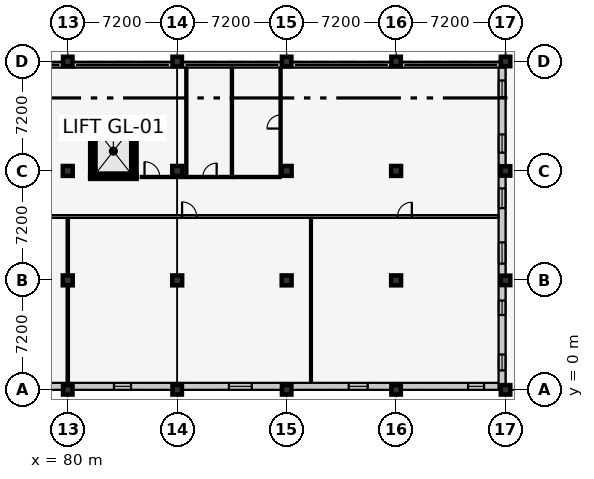
"""IFC4 building model, lengths in metres.
Left out: names, types, materials, properties, quantities, classifications, styles, units other than length and angle.
Written with IfcOpenShell. Run it as: python <this file> out.ifc"""

import sys

from ifc_helpers import new_model, si_unit, direction, frame, frame_2d, origin, origin_2d, place, context, subcontext, project, spatial, rectangle, extrude, element, fill, save


model = new_model("IFC4")
c1 = context("Model", 3, precision=1e-05, world=origin(), true_north=direction((0.0, 1.0)))
c2 = subcontext(c1, "Body", "Model", "MODEL_VIEW")
j1 = project(units=[si_unit("LENGTHUNIT", "METRE"), si_unit("PLANEANGLEUNIT", "RADIAN")], contexts=[c1])
p1 = place(None, origin())
s1 = spatial("IfcSite", under=j1, at=p1, CompositionType="ELEMENT")
p2 = place(p1, origin())
s2 = spatial("IfcBuilding", under=s1, at=p2, CompositionType="ELEMENT")
p3 = place(p2, frame((0.0, 0.0, 5.4)))
s3 = spatial("IfcBuildingStorey", under=s2, at=p3, CompositionType="ELEMENT", Elevation=5.4)
p4 = place(p3, frame((80.0, 0.0, 0.0), z_axis=(0.0, 0.0, 1.0), x_axis=(1.0, 0.0, 0.0)))
e1 = element("IfcColumn", 1, at=p4, inside=s3, PredefinedType="COLUMN", context=c2, shape_type="SweptSolid", body=[
    extrude(rectangle(XDim=0.62, YDim=0.62, at=origin_2d()), origin(), (0.0, 0.0, 1.0), 4.2),
])
for number, where, z_axis, x_axis in (
    (2, (80.0, 7.2, 0.0), (0.0, 0.0, 1.0), (1.0, 0.0, 0.0)),
    (3, (80.0, 14.4, 0.0), (0.0, 0.0, 1.0), (1.0, 0.0, 0.0)),
):
    element("IfcColumn", number, at=place(p3, frame(where, z_axis=z_axis, x_axis=x_axis)), inside=s3, PredefinedType="COLUMN", context=c2, shape_type="SweptSolid", body=[
        extrude(rectangle(XDim=0.65, YDim=0.65, at=origin_2d()), origin(), (0.0, 0.0, 1.0), 4.2),
    ])
for number, where, z_axis, x_axis in (
    (4, (80.0, 21.6, 0.0), (0.0, 0.0, 1.0), (1.0, 0.0, 0.0)),
    (5, (87.2, 0.0, 0.0), (0.0, 0.0, 1.0), (1.0, 0.0, 0.0)),
):
    element("IfcColumn", number, at=place(p3, frame(where, z_axis=z_axis, x_axis=x_axis)), inside=s3, PredefinedType="COLUMN", context=c2, shape_type="SweptSolid", body=[
        extrude(rectangle(XDim=0.62, YDim=0.62, at=origin_2d()), origin(), (0.0, 0.0, 1.0), 4.2),
    ])
for number, where, z_axis, x_axis in (
    (6, (87.2, 7.2, 0.0), (0.0, 0.0, 1.0), (1.0, 0.0, 0.0)),
    (7, (87.2, 14.4, 0.0), (0.0, 0.0, 1.0), (1.0, 0.0, 0.0)),
):
    element("IfcColumn", number, at=place(p3, frame(where, z_axis=z_axis, x_axis=x_axis)), inside=s3, PredefinedType="COLUMN", context=c2, shape_type="SweptSolid", body=[
        extrude(rectangle(XDim=0.65, YDim=0.65, at=origin_2d()), origin(), (0.0, 0.0, 1.0), 4.2),
    ])
for number, where, z_axis, x_axis in (
    (8, (87.2, 21.6, 0.0), (0.0, 0.0, 1.0), (1.0, 0.0, 0.0)),
    (9, (94.4, 0.0, 0.0), (0.0, 0.0, 1.0), (1.0, 0.0, 0.0)),
):
    element("IfcColumn", number, at=place(p3, frame(where, z_axis=z_axis, x_axis=x_axis)), inside=s3, PredefinedType="COLUMN", context=c2, shape_type="SweptSolid", body=[
        extrude(rectangle(XDim=0.62, YDim=0.62, at=origin_2d()), origin(), (0.0, 0.0, 1.0), 4.2),
    ])
for number, where, z_axis, x_axis in (
    (10, (94.4, 7.2, 0.0), (0.0, 0.0, 1.0), (1.0, 0.0, 0.0)),
    (11, (94.4, 14.4, 0.0), (0.0, 0.0, 1.0), (1.0, 0.0, 0.0)),
):
    element("IfcColumn", number, at=place(p3, frame(where, z_axis=z_axis, x_axis=x_axis)), inside=s3, PredefinedType="COLUMN", context=c2, shape_type="SweptSolid", body=[
        extrude(rectangle(XDim=0.65, YDim=0.65, at=origin_2d()), origin(), (0.0, 0.0, 1.0), 4.2),
    ])
for number, where, z_axis, x_axis in (
    (12, (94.4, 21.6, 0.0), (0.0, 0.0, 1.0), (1.0, 0.0, 0.0)),
    (13, (101.6, 0.0, 0.0), (0.0, 0.0, 1.0), (1.0, 0.0, 0.0)),
):
    element("IfcColumn", number, at=place(p3, frame(where, z_axis=z_axis, x_axis=x_axis)), inside=s3, PredefinedType="COLUMN", context=c2, shape_type="SweptSolid", body=[
        extrude(rectangle(XDim=0.62, YDim=0.62, at=origin_2d()), origin(), (0.0, 0.0, 1.0), 4.2),
    ])
for number, where, z_axis, x_axis in (
    (14, (101.6, 7.2, 0.0), (0.0, 0.0, 1.0), (1.0, 0.0, 0.0)),
    (15, (101.6, 14.4, 0.0), (0.0, 0.0, 1.0), (1.0, 0.0, 0.0)),
):
    element("IfcColumn", number, at=place(p3, frame(where, z_axis=z_axis, x_axis=x_axis)), inside=s3, PredefinedType="COLUMN", context=c2, shape_type="SweptSolid", body=[
        extrude(rectangle(XDim=0.65, YDim=0.65, at=origin_2d()), origin(), (0.0, 0.0, 1.0), 4.2),
    ])
for number, where, z_axis, x_axis in (
    (16, (101.6, 21.6, 0.0), (0.0, 0.0, 1.0), (1.0, 0.0, 0.0)),
    (17, (108.8, 0.0, 0.0), (0.0, 0.0, 1.0), (1.0, 0.0, 0.0)),
    (18, (108.8, 7.2, 0.0), (0.0, 0.0, 1.0), (1.0, 0.0, 0.0)),
    (19, (108.8, 14.4, 0.0), (0.0, 0.0, 1.0), (1.0, 0.0, 0.0)),
    (20, (108.8, 21.6, 0.0), (0.0, 0.0, 1.0), (1.0, 0.0, 0.0)),
):
    element("IfcColumn", number, at=place(p3, frame(where, z_axis=z_axis, x_axis=x_axis)), inside=s3, PredefinedType="COLUMN", context=c2, shape_type="SweptSolid", body=[
        extrude(rectangle(XDim=0.62, YDim=0.62, at=origin_2d()), origin(), (0.0, 0.0, 1.0), 4.2),
    ])
p5 = place(p3, frame((108.8, 0.23, 0.0), z_axis=(0.0, 0.0, 1.0), x_axis=(-1.0, 0.0, 0.0)))
e21 = element("IfcWall", 21, at=p5, inside=s3, PredefinedType="SOLIDWALL", context=c2, shape_type="SweptSolid", body=[
    extrude(rectangle(XDim=50.4, YDim=0.46, at=frame_2d((25.2, 0.0))), origin(), (0.0, 0.0, 1.0), 3.245),
])
p6 = place(p5, frame((1.414, 0.0, 0.9)))
e22 = element("IfcOpeningElement", 22, at=p6, cuts=e21, PredefinedType="OPENING", context=c2, shape_type="SweptSolid", body=[
    extrude(rectangle(XDim=1.05, YDim=1.6, at=frame_2d((0.525, 0.8))), frame((0.0, 0.242, 0.0), z_axis=(0.0, -1.0, 0.0), x_axis=(1.0, 0.0, 0.0)), (0.0, 0.0, 1.0), 0.484),
])
p7 = place(p5, frame((9.067, 0.0, 0.9)))
e23 = element("IfcOpeningElement", 23, at=p7, cuts=e21, PredefinedType="OPENING", context=c2, shape_type="SweptSolid", body=[
    extrude(rectangle(XDim=1.25, YDim=1.6, at=frame_2d((0.625, 0.8))), frame((0.0, 0.242, 0.0), z_axis=(0.0, -1.0, 0.0), x_axis=(1.0, 0.0, 0.0)), (0.0, 0.0, 1.0), 0.484),
])
p8 = place(p5, frame((16.696, 0.0, 0.9)))
e24 = element("IfcOpeningElement", 24, at=p8, cuts=e21, PredefinedType="OPENING", context=c2, shape_type="SweptSolid", body=[
    extrude(rectangle(XDim=1.5, YDim=1.6, at=frame_2d((0.75, 0.8))), frame((0.0, 0.242, 0.0), z_axis=(0.0, -1.0, 0.0), x_axis=(1.0, 0.0, 0.0)), (0.0, 0.0, 1.0), 0.484),
])
p9 = place(p5, frame((24.64, 0.0, 0.9)))
e25 = element("IfcOpeningElement", 25, at=p9, cuts=e21, PredefinedType="OPENING", context=c2, shape_type="SweptSolid", body=[
    extrude(rectangle(XDim=1.12, YDim=1.75, at=frame_2d((0.56, 0.875))), frame((0.0, 0.242, 0.0), z_axis=(0.0, -1.0, 0.0), x_axis=(1.0, 0.0, 0.0)), (0.0, 0.0, 1.0), 0.484),
])
p10 = place(p5, frame((32.284, 0.0, 0.9)))
e26 = element("IfcOpeningElement", 26, at=p10, cuts=e21, PredefinedType="OPENING", context=c2, shape_type="SweptSolid", body=[
    extrude(rectangle(XDim=1.34, YDim=1.75, at=frame_2d((0.67, 0.875))), frame((0.0, 0.242, 0.0), z_axis=(0.0, -1.0, 0.0), x_axis=(1.0, 0.0, 0.0)), (0.0, 0.0, 1.0), 0.484),
])
p11 = place(p5, frame((39.958, 0.0, 0.9)))
e27 = element("IfcOpeningElement", 27, at=p11, cuts=e21, PredefinedType="OPENING", context=c2, shape_type="SweptSolid", body=[
    extrude(rectangle(XDim=1.5, YDim=1.75, at=frame_2d((0.75, 0.875))), frame((0.0, 0.242, 0.0), z_axis=(0.0, -1.0, 0.0), x_axis=(1.0, 0.0, 0.0)), (0.0, 0.0, 1.0), 0.484),
])
p12 = place(p5, frame((44.135, 0.0, 0.9)))
e28 = element("IfcOpeningElement", 28, at=p12, cuts=e21, PredefinedType="OPENING", context=c2, shape_type="SweptSolid", body=[
    extrude(rectangle(XDim=0.9, YDim=1.35, at=frame_2d((0.45, 0.675))), frame((0.0, 0.242, 0.0), z_axis=(0.0, -1.0, 0.0), x_axis=(1.0, 0.0, 0.0)), (0.0, 0.0, 1.0), 0.484),
])
p13 = place(p5, frame((47.961, 0.0, 0.9)))
e29 = element("IfcOpeningElement", 29, at=p13, cuts=e21, PredefinedType="OPENING", context=c2, shape_type="SweptSolid", body=[
    extrude(rectangle(XDim=1.0, YDim=1.35, at=frame_2d((0.5, 0.675))), frame((0.0, 0.242, 0.0), z_axis=(0.0, -1.0, 0.0), x_axis=(1.0, 0.0, 0.0)), (0.0, 0.0, 1.0), 0.484),
])
p14 = place(p3, frame((108.57, 21.6, 0.0), z_axis=(0.0, 0.0, 1.0), x_axis=(0.0, -1.0, 0.0)))
e30 = element("IfcWall", 30, at=p14, inside=s3, PredefinedType="SOLIDWALL", context=c2, shape_type="SweptSolid", body=[
    extrude(rectangle(XDim=21.6, YDim=0.46, at=frame_2d((10.8, 0.0))), origin(), (0.0, 0.0, 1.0), 3.215),
])
p15 = place(p14, frame((1.25, 0.0, 0.9)))
e31 = element("IfcOpeningElement", 31, at=p15, cuts=e30, PredefinedType="OPENING", context=c2, shape_type="SweptSolid", body=[
    extrude(rectangle(XDim=1.1, YDim=1.35, at=frame_2d((0.55, 0.675))), frame((0.0, 0.242, 0.0), z_axis=(0.0, -1.0, 0.0), x_axis=(1.0, 0.0, 0.0)), (0.0, 0.0, 1.0), 0.484),
])
p16 = place(p14, frame((4.8, 0.0, 0.9)))
e32 = element("IfcOpeningElement", 32, at=p16, cuts=e30, PredefinedType="OPENING", context=c2, shape_type="SweptSolid", body=[
    extrude(rectangle(XDim=1.2, YDim=1.35, at=frame_2d((0.6, 0.675))), frame((0.0, 0.242, 0.0), z_axis=(0.0, -1.0, 0.0), x_axis=(1.0, 0.0, 0.0)), (0.0, 0.0, 1.0), 0.484),
])
p17 = place(p14, frame((8.35, 0.0, 0.9)))
e33 = element("IfcOpeningElement", 33, at=p17, cuts=e30, PredefinedType="OPENING", context=c2, shape_type="SweptSolid", body=[
    extrude(rectangle(XDim=1.3, YDim=1.35, at=frame_2d((0.65, 0.675))), frame((0.0, 0.242, 0.0), z_axis=(0.0, -1.0, 0.0), x_axis=(1.0, 0.0, 0.0)), (0.0, 0.0, 1.0), 0.484),
])
p18 = place(p14, frame((11.9, 0.0, 0.9)))
e34 = element("IfcOpeningElement", 34, at=p18, cuts=e30, PredefinedType="OPENING", context=c2, shape_type="SweptSolid", body=[
    extrude(rectangle(XDim=1.4, YDim=1.35, at=frame_2d((0.7, 0.675))), frame((0.0, 0.242, 0.0), z_axis=(0.0, -1.0, 0.0), x_axis=(1.0, 0.0, 0.0)), (0.0, 0.0, 1.0), 0.484),
])
p19 = place(p14, frame((15.725, 0.0, 0.9)))
e35 = element("IfcOpeningElement", 35, at=p19, cuts=e30, PredefinedType="OPENING", context=c2, shape_type="SweptSolid", body=[
    extrude(rectangle(XDim=0.95, YDim=1.45, at=frame_2d((0.475, 0.725))), frame((0.0, 0.242, 0.0), z_axis=(0.0, -1.0, 0.0), x_axis=(1.0, 0.0, 0.0)), (0.0, 0.0, 1.0), 0.484),
])
p20 = place(p14, frame((19.275, 0.0, 0.9)))
e36 = element("IfcOpeningElement", 36, at=p20, cuts=e30, PredefinedType="OPENING", context=c2, shape_type="SweptSolid", body=[
    extrude(rectangle(XDim=1.05, YDim=1.45, at=frame_2d((0.525, 0.725))), frame((0.0, 0.242, 0.0), z_axis=(0.0, -1.0, 0.0), x_axis=(1.0, 0.0, 0.0)), (0.0, 0.0, 1.0), 0.484),
])
p21 = place(p3, frame((58.4, 21.37, 0.0), z_axis=(0.0, 0.0, 1.0), x_axis=(1.0, 0.0, 0.0)))
e37 = element("IfcWall", 37, at=p21, inside=s3, PredefinedType="SOLIDWALL", context=c2, shape_type="SweptSolid", body=[
    extrude(rectangle(XDim=50.4, YDim=0.35, at=frame_2d((25.2, 0.0))), origin(), (0.0, 0.0, 1.0), 0.85),
])
p22 = place(p3, frame((81.475, 14.0, 0.0), z_axis=(0.0, 0.0, 1.0), x_axis=(1.0, 0.0, 0.0)))
e38 = element("IfcWall", 38, at=p22, inside=s3, PredefinedType="SHEAR", context=c2, shape_type="SweptSolid", body=[
    extrude(rectangle(XDim=3.05, YDim=0.25, at=frame_2d((1.525, 0.0))), origin(), (0.0, 0.0, 1.0), 3.95),
])
p23 = place(p22, frame((0.725, 0.0, 0.0)))
e39 = element("IfcOpeningElement", 39, at=p23, cuts=e38, PredefinedType="OPENING", context=c2, shape_type="SweptSolid", body=[
    extrude(rectangle(XDim=1.6, YDim=2.3, at=frame_2d((0.8, 1.15))), frame((0.0, 0.137, 0.0), z_axis=(0.0, -1.0, 0.0), x_axis=(1.0, 0.0, 0.0)), (0.0, 0.0, 1.0), 0.274),
])
p24 = place(p3, frame((84.525, 17.4, 0.0), z_axis=(0.0, 0.0, 1.0), x_axis=(-1.0, 0.0, 0.0)))
e40 = element("IfcWall", 40, at=p24, inside=s3, PredefinedType="SHEAR", context=c2, shape_type="SweptSolid", body=[
    extrude(rectangle(XDim=3.05, YDim=0.25, at=frame_2d((1.525, 0.0))), origin(), (0.0, 0.0, 1.0), 3.95),
])
for number, where, z_axis, x_axis in (
    (41, (81.6, 17.4, 0.0), (0.0, 0.0, 1.0), (0.0, -1.0, 0.0)),
    (42, (84.4, 14.0, 0.0), (0.0, 0.0, 1.0), (0.0, 1.0, 0.0)),
):
    element("IfcWall", number, at=place(p3, frame(where, z_axis=z_axis, x_axis=x_axis)), inside=s3, PredefinedType="SHEAR", context=c2, shape_type="SweptSolid", body=[
        extrude(rectangle(XDim=3.4, YDim=0.25, at=frame_2d((1.7, 0.0))), origin(), (0.0, 0.0, 1.0), 3.95),
    ])
p25 = place(p3, frame((58.87, 11.4, 0.0), z_axis=(0.0, 0.0, 1.0), x_axis=(1.0, 0.0, 0.0)))
e43 = element("IfcWall", 43, at=p25, inside=s3, PredefinedType="PARTITIONING", context=c2, shape_type="SweptSolid", body=[
    extrude(rectangle(XDim=49.46, YDim=0.18, at=frame_2d((24.73, 0.0))), origin(), (0.0, 0.0, 1.0), 3.95),
])
p26 = place(p25, frame((10.075, 0.0, 0.0)))
e44 = element("IfcOpeningElement", 44, at=p26, cuts=e43, PredefinedType="OPENING", context=c2, shape_type="SweptSolid", body=[
    extrude(rectangle(XDim=0.98, YDim=2.12, at=frame_2d((0.49, 1.06))), frame((0.0, 0.102, 0.0), z_axis=(0.0, -1.0, 0.0), x_axis=(1.0, 0.0, 0.0)), (0.0, 0.0, 1.0), 0.204),
])
p27 = place(p25, frame((28.65, 0.0, 0.0)))
e45 = element("IfcOpeningElement", 45, at=p27, cuts=e43, PredefinedType="OPENING", context=c2, shape_type="SweptSolid", body=[
    extrude(rectangle(XDim=0.96, YDim=2.1, at=frame_2d((0.48, 1.05))), frame((0.0, 0.102, 0.0), z_axis=(0.0, -1.0, 0.0), x_axis=(1.0, 0.0, 0.0)), (0.0, 0.0, 1.0), 0.204),
])
p28 = place(p25, frame((42.825, 0.0, 0.0)))
e46 = element("IfcOpeningElement", 46, at=p28, cuts=e43, PredefinedType="OPENING", context=c2, shape_type="SweptSolid", body=[
    extrude(rectangle(XDim=0.94, YDim=2.1, at=frame_2d((0.47, 1.05))), frame((0.0, 0.102, 0.0), z_axis=(0.0, -1.0, 0.0), x_axis=(1.0, 0.0, 0.0)), (0.0, 0.0, 1.0), 0.204),
])
p29 = place(p3, frame((80.0, 0.47, 0.0), z_axis=(0.0, 0.0, 1.0), x_axis=(0.0, 1.0, 0.0)))
e47 = element("IfcWall", 47, at=p29, inside=s3, PredefinedType="PARTITIONING", context=c2, shape_type="SweptSolid", body=[
    extrude(rectangle(XDim=10.83, YDim=0.15, at=frame_2d((5.415, 0.0))), origin(), (0.0, 0.0, 1.0), 3.325),
])
p30 = place(p3, frame((96.0, 0.47, 0.0), z_axis=(0.0, 0.0, 1.0), x_axis=(0.0, 1.0, 0.0)))
e48 = element("IfcWall", 48, at=p30, inside=s3, PredefinedType="PARTITIONING", context=c2, shape_type="SweptSolid", body=[
    extrude(rectangle(XDim=10.83, YDim=0.125, at=frame_2d((5.415, 0.0))), origin(), (0.0, 0.0, 1.0), 3.95),
])
p31 = place(p3, frame((84.8, 14.0, 0.0), z_axis=(0.0, 0.0, 1.0), x_axis=(1.0, 0.0, 0.0)))
e49 = element("IfcWall", 49, at=p31, inside=s3, PredefinedType="PARTITIONING", context=c2, shape_type="SweptSolid", body=[
    extrude(rectangle(XDim=3.0, YDim=0.14, at=frame_2d((1.5, 0.0))), origin(), (0.0, 0.0, 1.0), 3.95),
])
p32 = place(p31, frame((0.25, 0.0, 0.0)))
e50 = element("IfcOpeningElement", 50, at=p32, cuts=e49, PredefinedType="OPENING", context=c2, shape_type="SweptSolid", body=[
    extrude(rectangle(XDim=1.0, YDim=2.1, at=frame_2d((0.5, 1.05))), frame((0.0, 0.082, 0.0), z_axis=(0.0, -1.0, 0.0), x_axis=(1.0, 0.0, 0.0)), (0.0, 0.0, 1.0), 0.164),
])
p33 = place(p3, frame((87.8, 14.08, 0.0), z_axis=(0.0, 0.0, 1.0), x_axis=(0.0, 1.0, 0.0)))
e51 = element("IfcWall", 51, at=p33, inside=s3, PredefinedType="PARTITIONING", context=c2, shape_type="SweptSolid", body=[
    extrude(rectangle(XDim=7.105, YDim=0.14, at=frame_2d((3.552, 0.0))), origin(), (0.0, 0.0, 1.0), 3.95),
])
p34 = place(p3, frame((87.88, 14.0, 0.0), z_axis=(0.0, 0.0, 1.0), x_axis=(1.0, 0.0, 0.0)))
e52 = element("IfcWall", 52, at=p34, inside=s3, PredefinedType="PARTITIONING", context=c2, shape_type="SweptSolid", body=[
    extrude(rectangle(XDim=2.92, YDim=0.14, at=frame_2d((1.46, 0.0))), origin(), (0.0, 0.0, 1.0), 3.95),
])
p35 = place(p34, frame((1.005, 0.0, 0.0)))
e53 = element("IfcOpeningElement", 53, at=p35, cuts=e52, PredefinedType="OPENING", context=c2, shape_type="SweptSolid", body=[
    extrude(rectangle(XDim=0.91, YDim=2.06, at=frame_2d((0.455, 1.03))), frame((0.0, 0.082, 0.0), z_axis=(0.0, -1.0, 0.0), x_axis=(1.0, 0.0, 0.0)), (0.0, 0.0, 1.0), 0.164),
])
p36 = place(p3, frame((90.8, 14.08, 0.0), z_axis=(0.0, 0.0, 1.0), x_axis=(0.0, 1.0, 0.0)))
e54 = element("IfcWall", 54, at=p36, inside=s3, PredefinedType="PARTITIONING", context=c2, shape_type="SweptSolid", body=[
    extrude(rectangle(XDim=7.105, YDim=0.14, at=frame_2d((3.552, 0.0))), origin(), (0.0, 0.0, 1.0), 3.605),
])
p37 = place(p3, frame((90.88, 14.0, 0.0), z_axis=(0.0, 0.0, 1.0), x_axis=(1.0, 0.0, 0.0)))
e55 = element("IfcWall", 55, at=p37, inside=s3, PredefinedType="PARTITIONING", context=c2, shape_type="SweptSolid", body=[
    extrude(rectangle(XDim=3.12, YDim=0.14, at=frame_2d((1.56, 0.0))), origin(), (0.0, 0.0, 1.0), 3.95),
])
p38 = place(p3, frame((94.0, 14.08, 0.0), z_axis=(0.0, 0.0, 1.0), x_axis=(0.0, 1.0, 0.0)))
e56 = element("IfcWall", 56, at=p38, inside=s3, PredefinedType="PARTITIONING", context=c2, shape_type="SweptSolid", body=[
    extrude(rectangle(XDim=7.105, YDim=0.14, at=frame_2d((3.552, 0.0))), origin(), (0.0, 0.0, 1.0), 3.95),
])
p39 = place(p38, frame((3.107, 0.0, 0.0)))
e57 = element("IfcOpeningElement", 57, at=p39, cuts=e56, PredefinedType="OPENING", context=c2, shape_type="SweptSolid", body=[
    extrude(rectangle(XDim=0.89, YDim=2.05, at=frame_2d((0.445, 1.025))), frame((0.0, 0.082, 0.0), z_axis=(0.0, -1.0, 0.0), x_axis=(1.0, 0.0, 0.0)), (0.0, 0.0, 1.0), 0.164),
])
p40 = place(p6, origin())
e58 = element("IfcWindow", 58, at=p40, inside=s3, PartitioningType="SINGLE_PANEL", PredefinedType="WINDOW", context=c2, shape_type="SweptSolid", body=[
    extrude(rectangle(XDim=1.05, YDim=1.6, at=frame_2d((0.525, 0.8))), frame((0.0, 0.03, 0.0), z_axis=(0.0, -1.0, 0.0), x_axis=(1.0, 0.0, 0.0)), (0.0, 0.0, 1.0), 0.06),
])
fill(e22, e58)
p41 = place(p7, origin())
e59 = element("IfcWindow", 59, at=p41, inside=s3, PartitioningType="SINGLE_PANEL", PredefinedType="WINDOW", context=c2, shape_type="SweptSolid", body=[
    extrude(rectangle(XDim=1.25, YDim=1.6, at=frame_2d((0.625, 0.8))), frame((0.0, 0.03, 0.0), z_axis=(0.0, -1.0, 0.0), x_axis=(1.0, 0.0, 0.0)), (0.0, 0.0, 1.0), 0.06),
])
fill(e23, e59)
p42 = place(p8, origin())
e60 = element("IfcWindow", 60, at=p42, inside=s3, PartitioningType="SINGLE_PANEL", PredefinedType="WINDOW", context=c2, shape_type="SweptSolid", body=[
    extrude(rectangle(XDim=1.5, YDim=1.6, at=frame_2d((0.75, 0.8))), frame((0.0, 0.03, 0.0), z_axis=(0.0, -1.0, 0.0), x_axis=(1.0, 0.0, 0.0)), (0.0, 0.0, 1.0), 0.06),
])
fill(e24, e60)
p43 = place(p9, origin())
e61 = element("IfcWindow", 61, at=p43, inside=s3, PartitioningType="SINGLE_PANEL", PredefinedType="WINDOW", context=c2, shape_type="SweptSolid", body=[
    extrude(rectangle(XDim=1.12, YDim=1.75, at=frame_2d((0.56, 0.875))), frame((0.0, 0.03, 0.0), z_axis=(0.0, -1.0, 0.0), x_axis=(1.0, 0.0, 0.0)), (0.0, 0.0, 1.0), 0.06),
])
fill(e25, e61)
p44 = place(p15, origin())
e62 = element("IfcWindow", 62, at=p44, inside=s3, PartitioningType="SINGLE_PANEL", PredefinedType="WINDOW", context=c2, shape_type="SweptSolid", body=[
    extrude(rectangle(XDim=1.1, YDim=1.35, at=frame_2d((0.55, 0.675))), frame((0.0, 0.03, 0.0), z_axis=(0.0, -1.0, 0.0), x_axis=(1.0, 0.0, 0.0)), (0.0, 0.0, 1.0), 0.06),
])
fill(e31, e62)
p45 = place(p16, origin())
e63 = element("IfcWindow", 63, at=p45, inside=s3, PartitioningType="SINGLE_PANEL", PredefinedType="WINDOW", context=c2, shape_type="SweptSolid", body=[
    extrude(rectangle(XDim=1.2, YDim=1.35, at=frame_2d((0.6, 0.675))), frame((0.0, 0.03, 0.0), z_axis=(0.0, -1.0, 0.0), x_axis=(1.0, 0.0, 0.0)), (0.0, 0.0, 1.0), 0.06),
])
fill(e32, e63)
p46 = place(p17, origin())
e64 = element("IfcWindow", 64, at=p46, inside=s3, PartitioningType="SINGLE_PANEL", PredefinedType="WINDOW", context=c2, shape_type="SweptSolid", body=[
    extrude(rectangle(XDim=1.3, YDim=1.35, at=frame_2d((0.65, 0.675))), frame((0.0, 0.03, 0.0), z_axis=(0.0, -1.0, 0.0), x_axis=(1.0, 0.0, 0.0)), (0.0, 0.0, 1.0), 0.06),
])
fill(e33, e64)
p47 = place(p18, origin())
e65 = element("IfcWindow", 65, at=p47, inside=s3, PartitioningType="SINGLE_PANEL", PredefinedType="WINDOW", context=c2, shape_type="SweptSolid", body=[
    extrude(rectangle(XDim=1.4, YDim=1.35, at=frame_2d((0.7, 0.675))), frame((0.0, 0.03, 0.0), z_axis=(0.0, -1.0, 0.0), x_axis=(1.0, 0.0, 0.0)), (0.0, 0.0, 1.0), 0.06),
])
fill(e34, e65)
p48 = place(p19, origin())
e66 = element("IfcWindow", 66, at=p48, inside=s3, PartitioningType="SINGLE_PANEL", PredefinedType="WINDOW", context=c2, shape_type="SweptSolid", body=[
    extrude(rectangle(XDim=0.95, YDim=1.45, at=frame_2d((0.475, 0.725))), frame((0.0, 0.03, 0.0), z_axis=(0.0, -1.0, 0.0), x_axis=(1.0, 0.0, 0.0)), (0.0, 0.0, 1.0), 0.06),
])
fill(e35, e66)
p49 = place(p20, origin())
e67 = element("IfcWindow", 67, at=p49, inside=s3, PartitioningType="SINGLE_PANEL", PredefinedType="WINDOW", context=c2, shape_type="SweptSolid", body=[
    extrude(rectangle(XDim=1.05, YDim=1.45, at=frame_2d((0.525, 0.725))), frame((0.0, 0.03, 0.0), z_axis=(0.0, -1.0, 0.0), x_axis=(1.0, 0.0, 0.0)), (0.0, 0.0, 1.0), 0.06),
])
fill(e36, e67)
p50 = place(p23, origin())
e68 = element("IfcDoor", 68, at=p50, inside=s3, OperationType="DOUBLE_DOOR_SLIDING", PredefinedType="DOOR", context=c2, shape_type="SweptSolid", body=[
    extrude(rectangle(XDim=1.6, YDim=2.3, at=frame_2d((0.8, 1.15))), frame((0.0, 0.025, 0.0), z_axis=(0.0, -1.0, 0.0), x_axis=(1.0, 0.0, 0.0)), (0.0, 0.0, 1.0), 0.05),
])
fill(e39, e68)
p51 = place(p27, origin())
e69 = element("IfcDoor", 69, at=p51, inside=s3, OperationType="SINGLE_SWING_LEFT", PredefinedType="DOOR", context=c2, shape_type="SweptSolid", body=[
    extrude(rectangle(XDim=0.96, YDim=2.1, at=frame_2d((0.48, 1.05))), frame((0.0, 0.025, 0.0), z_axis=(0.0, -1.0, 0.0), x_axis=(1.0, 0.0, 0.0)), (0.0, 0.0, 1.0), 0.05),
])
fill(e45, e69)
p52 = place(p28, origin())
e70 = element("IfcDoor", 70, at=p52, inside=s3, OperationType="SINGLE_SWING_RIGHT", PredefinedType="DOOR", context=c2, shape_type="SweptSolid", body=[
    extrude(rectangle(XDim=0.94, YDim=2.1, at=frame_2d((0.47, 1.05))), frame((0.0, 0.025, 0.0), z_axis=(0.0, -1.0, 0.0), x_axis=(1.0, 0.0, 0.0)), (0.0, 0.0, 1.0), 0.05),
])
fill(e46, e70)
p53 = place(p32, origin())
e71 = element("IfcDoor", 71, at=p53, inside=s3, OperationType="SINGLE_SWING_LEFT", PredefinedType="DOOR", context=c2, shape_type="SweptSolid", body=[
    extrude(rectangle(XDim=1.0, YDim=2.1, at=frame_2d((0.5, 1.05))), frame((0.0, 0.025, 0.0), z_axis=(0.0, -1.0, 0.0), x_axis=(1.0, 0.0, 0.0)), (0.0, 0.0, 1.0), 0.05),
])
fill(e50, e71)
p54 = place(p35, origin())
e72 = element("IfcDoor", 72, at=p54, inside=s3, OperationType="SINGLE_SWING_RIGHT", PredefinedType="DOOR", context=c2, shape_type="SweptSolid", body=[
    extrude(rectangle(XDim=0.91, YDim=2.06, at=frame_2d((0.455, 1.03))), frame((0.0, 0.025, 0.0), z_axis=(0.0, -1.0, 0.0), x_axis=(1.0, 0.0, 0.0)), (0.0, 0.0, 1.0), 0.05),
])
fill(e53, e72)
p55 = place(p39, origin())
e73 = element("IfcDoor", 73, at=p55, inside=s3, OperationType="SINGLE_SWING_LEFT", PredefinedType="DOOR", context=c2, shape_type="SweptSolid", body=[
    extrude(rectangle(XDim=0.89, YDim=2.05, at=frame_2d((0.445, 1.025))), frame((0.0, 0.025, 0.0), z_axis=(0.0, -1.0, 0.0), x_axis=(1.0, 0.0, 0.0)), (0.0, 0.0, 1.0), 0.05),
])
fill(e57, e73)
save(model, sys.argv[1])
